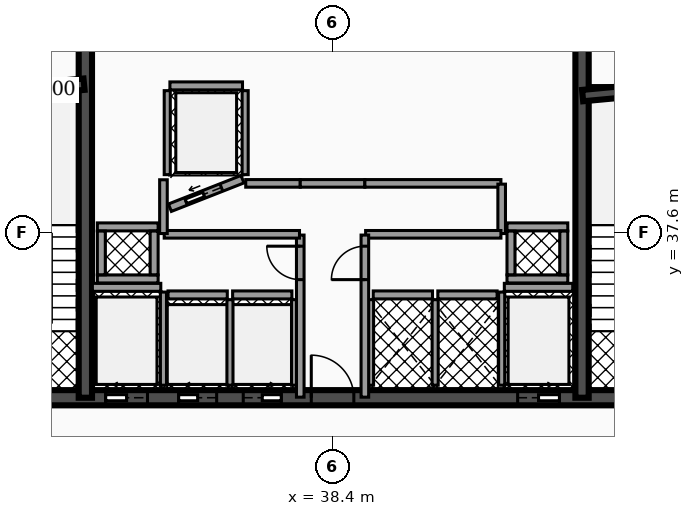
"""IFC4 building model, lengths in metres.
Left out: names, types, materials, properties, quantities, classifications, styles, units other than length and angle.
Written with IfcOpenShell. Run it as: python <this file> out.ifc"""

import sys

from ifc_helpers import new_model, si_unit, direction, frame, frame_2d, origin, place, context, subcontext, project, spatial, rectangle, extrude, element, fill, save


model = new_model("IFC4")
c1 = context("Model", 3, precision=1e-05, world=origin(), true_north=direction((0.0, 1.0)))
c2 = subcontext(c1, "Body", "Model", "MODEL_VIEW")
j1 = project(units=[si_unit("LENGTHUNIT", "METRE"), si_unit("PLANEANGLEUNIT", "RADIAN")], contexts=[c1])
p1 = place(None, origin())
s1 = spatial("IfcSite", under=j1, at=p1, CompositionType="ELEMENT")
p2 = place(p1, origin())
s2 = spatial("IfcBuilding", under=s1, at=p2, CompositionType="ELEMENT")
p3 = place(p2, frame((0.0, 0.0, 123.42)))
s3 = spatial("IfcBuildingStorey", under=s2, at=p3, CompositionType="ELEMENT", Elevation=123.42)
p4 = place(p3, frame((28.4, 33.25, 0.0), z_axis=(0.0, 0.0, 1.0), x_axis=(1.0, 0.0, 0.0)))
e1 = element("IfcWall", 1, at=p4, inside=s3, PredefinedType="SHEAR", context=c2, shape_type="SweptSolid", body=[
    extrude(rectangle(XDim=20.06, YDim=0.4, at=frame_2d((10.03, 0.0))), origin(), (0.0, 0.0, 1.0), 3.5),
])
p5 = place(p4, frame((4.03, 0.0, 0.0)))
e2 = element("IfcOpeningElement", 2, at=p5, cuts=e1, PredefinedType="OPENING", context=c2, shape_type="SweptSolid", body=[
    extrude(rectangle(XDim=1.1, YDim=2.15, at=frame_2d((0.55, 1.075))), frame((0.0, 0.21, 0.0), z_axis=(0.0, -1.0, 0.0), x_axis=(1.0, 0.0, 0.0)), (0.0, 0.0, 1.0), 0.42),
])
p6 = place(p4, frame((14.87, 0.0, 0.0)))
e3 = element("IfcOpeningElement", 3, at=p6, cuts=e1, PredefinedType="OPENING", context=c2, shape_type="SweptSolid", body=[
    extrude(rectangle(XDim=1.1, YDim=2.15, at=frame_2d((0.55, 1.075))), frame((0.0, 0.21, 0.0), z_axis=(0.0, -1.0, 0.0), x_axis=(1.0, 0.0, 0.0)), (0.0, 0.0, 1.0), 0.42),
])
p7 = place(p4, frame((5.95, 0.0, 0.0)))
e4 = element("IfcOpeningElement", 4, at=p7, cuts=e1, PredefinedType="OPENING", context=c2, shape_type="SweptSolid", body=[
    extrude(rectangle(XDim=1.0, YDim=2.1, at=frame_2d((0.5, 1.05))), frame((0.0, 0.21, 0.0), z_axis=(0.0, -1.0, 0.0), x_axis=(1.0, 0.0, 0.0)), (0.0, 0.0, 1.0), 0.42),
])
p8 = place(p4, frame((7.65, 0.0, 0.0)))
e5 = element("IfcOpeningElement", 5, at=p8, cuts=e1, PredefinedType="OPENING", context=c2, shape_type="SweptSolid", body=[
    extrude(rectangle(XDim=1.0, YDim=2.1, at=frame_2d((0.5, 1.05))), frame((0.0, 0.21, 0.0), z_axis=(0.0, -1.0, 0.0), x_axis=(1.0, 0.0, 0.0)), (0.0, 0.0, 1.0), 0.42),
])
p9 = place(p4, frame((1.31, 0.0, 0.0)))
e6 = element("IfcOpeningElement", 6, at=p9, cuts=e1, PredefinedType="OPENING", context=c2, shape_type="SweptSolid", body=[
    extrude(rectangle(XDim=1.1, YDim=2.2, at=frame_2d((0.55, 1.1))), frame((0.0, 0.21, 0.0), z_axis=(0.0, -1.0, 0.0), x_axis=(1.0, 0.0, 0.0)), (0.0, 0.0, 1.0), 0.42),
])
p10 = place(p4, frame((9.44, 0.0, 0.0)))
e7 = element("IfcOpeningElement", 7, at=p10, cuts=e1, PredefinedType="OPENING", context=c2, shape_type="SweptSolid", body=[
    extrude(rectangle(XDim=1.12, YDim=2.05, at=frame_2d((0.56, 1.025))), frame((0.0, 0.21, 0.0), z_axis=(0.0, -1.0, 0.0), x_axis=(1.0, 0.0, 0.0)), (0.0, 0.0, 1.0), 0.42),
])
p11 = place(p4, frame((17.65, 0.0, 0.0)))
e8 = element("IfcOpeningElement", 8, at=p11, cuts=e1, PredefinedType="OPENING", context=c2, shape_type="SweptSolid", body=[
    extrude(rectangle(XDim=1.1, YDim=2.2, at=frame_2d((0.55, 1.1))), frame((0.0, 0.21, 0.0), z_axis=(0.0, -1.0, 0.0), x_axis=(1.0, 0.0, 0.0)), (0.0, 0.0, 1.0), 0.42),
])
for number, where, z_axis, x_axis in (
    (9, (31.895, 33.25, 0.0), (0.0, 0.0, 1.0), (0.0, 1.0, 0.0)),
    (10, (44.965, 33.25, 0.0), (0.0, 0.0, 1.0), (0.0, 1.0, 0.0)),
):
    element("IfcWall", number, at=place(p3, frame(where, z_axis=z_axis, x_axis=x_axis)), inside=s3, PredefinedType="SHEAR", context=c2, shape_type="SweptSolid", body=[
        extrude(rectangle(XDim=10.2, YDim=0.35, at=frame_2d((5.1, 0.0))), origin(), (0.0, 0.0, 1.0), 3.5),
    ])
p12 = place(p3, frame((28.64, 41.2, 0.0), z_axis=(0.0, 0.0, 1.0), x_axis=(0.995687118776, 0.092774789157, 0.0)))
e11 = element("IfcWall", 11, at=p12, inside=s3, PredefinedType="SHEAR", context=c2, shape_type="SweptSolid", body=[
    extrude(rectangle(XDim=3.234, YDim=0.3, at=frame_2d((1.617, 0.0))), origin(), (0.0, 0.0, 1.0), 3.5),
])
p13 = place(p3, frame((44.98, 41.2, 0.0), z_axis=(0.0, 0.0, 1.0), x_axis=(0.995686468965, 0.09278176286, 0.0)))
e12 = element("IfcWall", 12, at=p13, inside=s3, PredefinedType="SHEAR", context=c2, shape_type="SweptSolid", body=[
    extrude(rectangle(XDim=3.234, YDim=0.3, at=frame_2d((1.617, 0.0))), origin(), (0.0, 0.0, 1.0), 3.5),
])
p14 = place(p3, frame((32.08, 36.155, 0.0), z_axis=(0.0, 0.0, 1.0), x_axis=(1.0, 0.0, 0.0)))
e13 = element("IfcWall", 13, at=p14, inside=s3, PredefinedType="SOLIDWALL", context=c2, shape_type="SweptSolid", body=[
    extrude(rectangle(XDim=1.8, YDim=0.21, at=frame_2d((0.9, 0.0))), origin(), (0.0, 0.0, 1.0), 2.472),
])
p15 = place(p3, frame((33.95, 33.58, 0.0), z_axis=(0.0, 0.0, 1.0), x_axis=(0.0, 1.0, 0.0)))
e14 = element("IfcWall", 14, at=p15, inside=s3, PredefinedType="SOLIDWALL", context=c2, shape_type="SweptSolid", body=[
    extrude(rectangle(XDim=2.45, YDim=0.16, at=frame_2d((1.225, 0.0))), origin(), (0.0, 0.0, 1.0), 2.472),
])
p16 = place(p3, frame((42.92, 36.155, 0.0), z_axis=(0.0, 0.0, 1.0), x_axis=(1.0, 0.0, 0.0)))
e15 = element("IfcWall", 15, at=p16, inside=s3, PredefinedType="SOLIDWALL", context=c2, shape_type="SweptSolid", body=[
    extrude(rectangle(XDim=1.8, YDim=0.21, at=frame_2d((0.9, 0.0))), origin(), (0.0, 0.0, 1.0), 2.472),
])
p17 = place(p3, frame((42.85, 33.58, 0.0), z_axis=(0.0, 0.0, 1.0), x_axis=(0.0, 1.0, 0.0)))
e16 = element("IfcWall", 16, at=p17, inside=s3, PredefinedType="SOLIDWALL", context=c2, shape_type="SweptSolid", body=[
    extrude(rectangle(XDim=2.45, YDim=0.16, at=frame_2d((1.225, 0.0))), origin(), (0.0, 0.0, 1.0), 2.472),
])
p18 = place(p3, frame((34.07, 35.955, 0.0), z_axis=(0.0, 0.0, 1.0), x_axis=(1.0, 0.0, 0.0)))
e17 = element("IfcWall", 17, at=p18, inside=s3, PredefinedType="SOLIDWALL", context=c2, shape_type="SweptSolid", body=[
    extrude(rectangle(XDim=1.56, YDim=0.21, at=frame_2d((0.78, 0.0))), origin(), (0.0, 0.0, 1.0), 2.472),
])
p19 = place(p3, frame((35.7, 33.58, 0.0), z_axis=(0.0, 0.0, 1.0), x_axis=(0.0, 1.0, 0.0)))
e18 = element("IfcWall", 18, at=p19, inside=s3, PredefinedType="SOLIDWALL", context=c2, shape_type="SweptSolid", body=[
    extrude(rectangle(XDim=2.25, YDim=0.16, at=frame_2d((1.125, 0.0))), origin(), (0.0, 0.0, 1.0), 2.472),
])
p20 = place(p3, frame((35.77, 35.955, 0.0), z_axis=(0.0, 0.0, 1.0), x_axis=(1.0, 0.0, 0.0)))
e19 = element("IfcWall", 19, at=p20, inside=s3, PredefinedType="SOLIDWALL", context=c2, shape_type="SweptSolid", body=[
    extrude(rectangle(XDim=1.56, YDim=0.21, at=frame_2d((0.78, 0.0))), origin(), (0.0, 0.0, 1.0), 2.472),
])
p21 = place(p3, frame((37.4, 33.58, 0.0), z_axis=(0.0, 0.0, 1.0), x_axis=(0.0, 1.0, 0.0)))
e20 = element("IfcWall", 20, at=p21, inside=s3, PredefinedType="SOLIDWALL", context=c2, shape_type="SweptSolid", body=[
    extrude(rectangle(XDim=2.25, YDim=0.16, at=frame_2d((1.125, 0.0))), origin(), (0.0, 0.0, 1.0), 2.472),
])
p22 = place(p3, frame((34.12, 38.25, 0.0), z_axis=(0.0, 0.0, 1.0), x_axis=(0.930804993012, 0.36551616241, 0.0)))
e21 = element("IfcWall", 21, at=p22, inside=s3, PredefinedType="SOLIDWALL", context=c2, shape_type="SweptSolid", body=[
    extrude(rectangle(XDim=2.052, YDim=0.21, at=frame_2d((1.026, 0.0))), origin(), (0.0, 0.0, 1.0), 2.472),
])
p23 = place(p22, frame((0.455, 0.0, 0.0)))
e22 = element("IfcOpeningElement", 22, at=p23, cuts=e21, PredefinedType="OPENING", context=c2, shape_type="SweptSolid", body=[
    extrude(rectangle(XDim=1.0, YDim=2.1, at=frame_2d((0.5, 1.05))), frame((0.0, 0.115, 0.0), z_axis=(0.0, -1.0, 0.0), x_axis=(1.0, 0.0, 0.0)), (0.0, 0.0, 1.0), 0.23),
])
p24 = place(p3, frame((34.12, 41.455, 0.0), z_axis=(0.0, 0.0, 1.0), x_axis=(1.0, 0.0, 0.0)))
e23 = element("IfcWall", 23, at=p24, inside=s3, PredefinedType="SOLIDWALL", context=c2, shape_type="SweptSolid", body=[
    extrude(rectangle(XDim=1.91, YDim=0.21, at=frame_2d((0.955, 0.0))), origin(), (0.0, 0.0, 1.0), 2.472),
])
for number, where, z_axis, x_axis in (
    (24, (34.05, 39.12, 0.0), (0.0, 0.0, 1.0), (0.0, 1.0, 0.0)),
    (25, (36.1, 39.12, 0.0), (0.0, 0.0, 1.0), (0.0, 1.0, 0.0)),
):
    element("IfcWall", number, at=place(p3, frame(where, z_axis=z_axis, x_axis=x_axis)), inside=s3, PredefinedType="SOLIDWALL", context=c2, shape_type="SweptSolid", body=[
        extrude(rectangle(XDim=2.21, YDim=0.16, at=frame_2d((1.105, 0.0))), origin(), (0.0, 0.0, 1.0), 2.472),
    ])
p25 = place(p3, frame((39.47, 35.955, 0.0), z_axis=(0.0, 0.0, 1.0), x_axis=(1.0, 0.0, 0.0)))
e26 = element("IfcWall", 26, at=p25, inside=s3, PredefinedType="SOLIDWALL", context=c2, shape_type="SweptSolid", body=[
    extrude(rectangle(XDim=1.56, YDim=0.21, at=frame_2d((0.78, 0.0))), origin(), (0.0, 0.0, 1.0), 2.472),
])
for number, where, z_axis, x_axis in (
    (27, (39.4, 33.58, 0.0), (0.0, 0.0, 1.0), (0.0, 1.0, 0.0)),
    (28, (41.1, 33.58, 0.0), (0.0, 0.0, 1.0), (0.0, 1.0, 0.0)),
):
    element("IfcWall", number, at=place(p3, frame(where, z_axis=z_axis, x_axis=x_axis)), inside=s3, PredefinedType="SOLIDWALL", context=c2, shape_type="SweptSolid", body=[
        extrude(rectangle(XDim=2.25, YDim=0.16, at=frame_2d((1.125, 0.0))), origin(), (0.0, 0.0, 1.0), 2.472),
    ])
p26 = place(p3, frame((41.17, 35.955, 0.0), z_axis=(0.0, 0.0, 1.0), x_axis=(1.0, 0.0, 0.0)))
e29 = element("IfcWall", 29, at=p26, inside=s3, PredefinedType="SOLIDWALL", context=c2, shape_type="SweptSolid", body=[
    extrude(rectangle(XDim=1.56, YDim=0.21, at=frame_2d((0.78, 0.0))), origin(), (0.0, 0.0, 1.0), 2.472),
])
for number, where, z_axis, x_axis in (
    (30, (32.21, 36.375, 0.0), (0.0, 0.0, 1.0), (1.0, 0.0, 0.0)),
    (31, (32.21, 37.745, 0.0), (0.0, 0.0, 1.0), (1.0, 0.0, 0.0)),
):
    element("IfcWall", number, at=place(p3, frame(where, z_axis=z_axis, x_axis=x_axis)), inside=s3, PredefinedType="SOLIDWALL", context=c2, shape_type="SweptSolid", body=[
        extrude(rectangle(XDim=1.6, YDim=0.21, at=frame_2d((0.8, 0.0))), origin(), (0.0, 0.0, 1.0), 3.5),
    ])
for number, where, z_axis, x_axis in (
    (32, (32.315, 36.485, 0.0), (0.0, 0.0, 1.0), (0.0, 1.0, 0.0)),
    (33, (33.705, 36.485, 0.0), (0.0, 0.0, 1.0), (0.0, 1.0, 0.0)),
):
    element("IfcWall", number, at=place(p3, frame(where, z_axis=z_axis, x_axis=x_axis)), inside=s3, PredefinedType="SOLIDWALL", context=c2, shape_type="SweptSolid", body=[
        extrude(rectangle(XDim=1.15, YDim=0.21, at=frame_2d((0.575, 0.0))), origin(), (0.0, 0.0, 1.0), 3.5),
    ])
for number, where, z_axis, x_axis in (
    (34, (42.99, 36.375, 0.0), (0.0, 0.0, 1.0), (1.0, 0.0, 0.0)),
    (35, (42.99, 37.745, 0.0), (0.0, 0.0, 1.0), (1.0, 0.0, 0.0)),
):
    element("IfcWall", number, at=place(p3, frame(where, z_axis=z_axis, x_axis=x_axis)), inside=s3, PredefinedType="SOLIDWALL", context=c2, shape_type="SweptSolid", body=[
        extrude(rectangle(XDim=1.6, YDim=0.21, at=frame_2d((0.8, 0.0))), origin(), (0.0, 0.0, 1.0), 3.5),
    ])
for number, where, z_axis, x_axis in (
    (36, (43.095, 36.485, 0.0), (0.0, 0.0, 1.0), (0.0, 1.0, 0.0)),
    (37, (44.485, 36.485, 0.0), (0.0, 0.0, 1.0), (0.0, 1.0, 0.0)),
):
    element("IfcWall", number, at=place(p3, frame(where, z_axis=z_axis, x_axis=x_axis)), inside=s3, PredefinedType="SOLIDWALL", context=c2, shape_type="SweptSolid", body=[
        extrude(rectangle(XDim=1.15, YDim=0.21, at=frame_2d((0.575, 0.0))), origin(), (0.0, 0.0, 1.0), 3.5),
    ])
p27 = place(p3, frame((37.55, 33.265, 0.0), z_axis=(0.0, 0.0, 1.0), x_axis=(0.0, 1.0, 0.0)))
e38 = element("IfcWall", 38, at=p27, inside=s3, PredefinedType="PARTITIONING", context=c2, shape_type="SweptSolid", body=[
    extrude(rectangle(XDim=4.265, YDim=0.2, at=frame_2d((2.133, 0.0))), origin(), (0.0, 0.0, 1.0), 2.457),
])
p28 = place(p27, frame((3.093, 0.0, 0.0)))
e39 = element("IfcOpeningElement", 39, at=p28, cuts=e38, PredefinedType="OPENING", context=c2, shape_type="SweptSolid", body=[
    extrude(rectangle(XDim=0.88, YDim=2.05, at=frame_2d((0.44, 1.025))), frame((0.0, 0.11, 0.0), z_axis=(0.0, -1.0, 0.0), x_axis=(1.0, 0.0, 0.0)), (0.0, 0.0, 1.0), 0.22),
])
p29 = place(p3, frame((33.97, 37.55, 0.0), z_axis=(0.0, 0.0, 1.0), x_axis=(1.0, 0.0, 0.0)))
e40 = element("IfcWall", 40, at=p29, inside=s3, PredefinedType="PARTITIONING", context=c2, shape_type="SweptSolid", body=[
    extrude(rectangle(XDim=3.56, YDim=0.2, at=frame_2d((1.78, 0.0))), origin(), (0.0, 0.0, 1.0), 2.457),
])
p30 = place(p3, frame((33.95, 37.57, 0.0), z_axis=(0.0, 0.0, 1.0), x_axis=(0.0, 1.0, 0.0)))
e41 = element("IfcWall", 41, at=p30, inside=s3, PredefinedType="PARTITIONING", context=c2, shape_type="SweptSolid", body=[
    extrude(rectangle(XDim=1.415, YDim=0.2, at=frame_2d((0.708, 0.0))), origin(), (0.0, 0.0, 1.0), 2.457),
])
p31 = place(p3, frame((36.115, 38.89, 0.0), z_axis=(0.0, 0.0, 1.0), x_axis=(1.0, 0.0, 0.0)))
e42 = element("IfcWall", 42, at=p31, inside=s3, PredefinedType="PARTITIONING", context=c2, shape_type="SweptSolid", body=[
    extrude(rectangle(XDim=1.435, YDim=0.2, at=frame_2d((0.718, 0.0))), origin(), (0.0, 0.0, 1.0), 2.457),
])
p32 = place(p3, frame((37.55, 38.89, 0.0), z_axis=(0.0, 0.0, 1.0), x_axis=(1.0, 0.0, 0.0)))
e43 = element("IfcWall", 43, at=p32, inside=s3, PredefinedType="PARTITIONING", context=c2, shape_type="SweptSolid", body=[
    extrude(rectangle(XDim=1.7, YDim=0.2, at=frame_2d((0.85, 0.0))), origin(), (0.0, 0.0, 1.0), 2.457),
])
p33 = place(p3, frame((39.25, 38.89, 0.0), z_axis=(0.0, 0.0, 1.0), x_axis=(1.0, 0.0, 0.0)))
e44 = element("IfcWall", 44, at=p33, inside=s3, PredefinedType="PARTITIONING", context=c2, shape_type="SweptSolid", body=[
    extrude(rectangle(XDim=3.58, YDim=0.2, at=frame_2d((1.79, 0.0))), origin(), (0.0, 0.0, 1.0), 2.457),
])
p34 = place(p3, frame((42.85, 37.57, 0.0), z_axis=(0.0, 0.0, 1.0), x_axis=(0.0, 1.0, 0.0)))
e45 = element("IfcWall", 45, at=p34, inside=s3, PredefinedType="PARTITIONING", context=c2, shape_type="SweptSolid", body=[
    extrude(rectangle(XDim=1.3, YDim=0.2, at=frame_2d((0.65, 0.0))), origin(), (0.0, 0.0, 1.0), 2.457),
])
p35 = place(p3, frame((39.27, 37.55, 0.0), z_axis=(0.0, 0.0, 1.0), x_axis=(1.0, 0.0, 0.0)))
e46 = element("IfcWall", 46, at=p35, inside=s3, PredefinedType="PARTITIONING", context=c2, shape_type="SweptSolid", body=[
    extrude(rectangle(XDim=3.56, YDim=0.2, at=frame_2d((1.78, 0.0))), origin(), (0.0, 0.0, 1.0), 2.457),
])
p36 = place(p3, frame((39.25, 33.265, 0.0), z_axis=(0.0, 0.0, 1.0), x_axis=(0.0, 1.0, 0.0)))
e47 = element("IfcWall", 47, at=p36, inside=s3, PredefinedType="PARTITIONING", context=c2, shape_type="SweptSolid", body=[
    extrude(rectangle(XDim=4.265, YDim=0.2, at=frame_2d((2.133, 0.0))), origin(), (0.0, 0.0, 1.0), 2.457),
])
p37 = place(p36, frame((3.093, 0.0, 0.0)))
e48 = element("IfcOpeningElement", 48, at=p37, cuts=e47, PredefinedType="OPENING", context=c2, shape_type="SweptSolid", body=[
    extrude(rectangle(XDim=0.88, YDim=2.05, at=frame_2d((0.44, 1.025))), frame((0.0, 0.11, 0.0), z_axis=(0.0, -1.0, 0.0), x_axis=(1.0, 0.0, 0.0)), (0.0, 0.0, 1.0), 0.22),
])
p38 = place(p5, origin())
e49 = element("IfcDoor", 49, at=p38, inside=s3, OperationType="SLIDING_TO_LEFT", PredefinedType="DOOR", context=c2, shape_type="SweptSolid", body=[
    extrude(rectangle(XDim=1.1, YDim=2.15, at=frame_2d((0.55, 1.075))), frame((0.0, 0.025, 0.0), z_axis=(0.0, -1.0, 0.0), x_axis=(1.0, 0.0, 0.0)), (0.0, 0.0, 1.0), 0.05),
])
fill(e2, e49)
p39 = place(p6, origin())
e50 = element("IfcDoor", 50, at=p39, inside=s3, OperationType="SLIDING_TO_RIGHT", PredefinedType="DOOR", context=c2, shape_type="SweptSolid", body=[
    extrude(rectangle(XDim=1.1, YDim=2.15, at=frame_2d((0.55, 1.075))), frame((0.0, 0.025, 0.0), z_axis=(0.0, -1.0, 0.0), x_axis=(1.0, 0.0, 0.0)), (0.0, 0.0, 1.0), 0.05),
])
fill(e3, e50)
p40 = place(p7, origin())
e51 = element("IfcDoor", 51, at=p40, inside=s3, OperationType="SLIDING_TO_LEFT", PredefinedType="DOOR", context=c2, shape_type="SweptSolid", body=[
    extrude(rectangle(XDim=1.0, YDim=2.1, at=frame_2d((0.5, 1.05))), frame((0.0, 0.025, 0.0), z_axis=(0.0, -1.0, 0.0), x_axis=(1.0, 0.0, 0.0)), (0.0, 0.0, 1.0), 0.05),
])
fill(e4, e51)
p41 = place(p8, origin())
e52 = element("IfcDoor", 52, at=p41, inside=s3, OperationType="SLIDING_TO_RIGHT", PredefinedType="DOOR", context=c2, shape_type="SweptSolid", body=[
    extrude(rectangle(XDim=1.0, YDim=2.1, at=frame_2d((0.5, 1.05))), frame((0.0, 0.025, 0.0), z_axis=(0.0, -1.0, 0.0), x_axis=(1.0, 0.0, 0.0)), (0.0, 0.0, 1.0), 0.05),
])
fill(e5, e52)
p42 = place(p23, origin())
e53 = element("IfcDoor", 53, at=p42, inside=s3, OperationType="SLIDING_TO_LEFT", PredefinedType="DOOR", context=c2, shape_type="SweptSolid", body=[
    extrude(rectangle(XDim=1.0, YDim=2.1, at=frame_2d((0.5, 1.05))), frame((0.0, 0.025, 0.0), z_axis=(0.0, -1.0, 0.0), x_axis=(1.0, 0.0, 0.0)), (0.0, 0.0, 1.0), 0.05),
])
fill(e22, e53)
p43 = place(p10, origin())
e54 = element("IfcDoor", 54, at=p43, inside=s3, OperationType="SINGLE_SWING_LEFT", PredefinedType="DOOR", context=c2, shape_type="SweptSolid", body=[
    extrude(rectangle(XDim=1.12, YDim=2.05, at=frame_2d((0.56, 1.025))), frame((0.0, 0.025, 0.0), z_axis=(0.0, -1.0, 0.0), x_axis=(1.0, 0.0, 0.0)), (0.0, 0.0, 1.0), 0.05),
])
fill(e7, e54)
p44 = place(p28, origin())
e55 = element("IfcDoor", 55, at=p44, inside=s3, OperationType="SINGLE_SWING_RIGHT", PredefinedType="DOOR", context=c2, shape_type="SweptSolid", body=[
    extrude(rectangle(XDim=0.88, YDim=2.05, at=frame_2d((0.44, 1.025))), frame((0.0, 0.025, 0.0), z_axis=(0.0, -1.0, 0.0), x_axis=(1.0, 0.0, 0.0)), (0.0, 0.0, 1.0), 0.05),
])
fill(e39, e55)
p45 = place(p37, origin())
e56 = element("IfcDoor", 56, at=p45, inside=s3, OperationType="SINGLE_SWING_LEFT", PredefinedType="DOOR", context=c2, shape_type="SweptSolid", body=[
    extrude(rectangle(XDim=0.88, YDim=2.05, at=frame_2d((0.44, 1.025))), frame((0.0, 0.025, 0.0), z_axis=(0.0, -1.0, 0.0), x_axis=(1.0, 0.0, 0.0)), (0.0, 0.0, 1.0), 0.05),
])
fill(e48, e56)
save(model, sys.argv[1])
